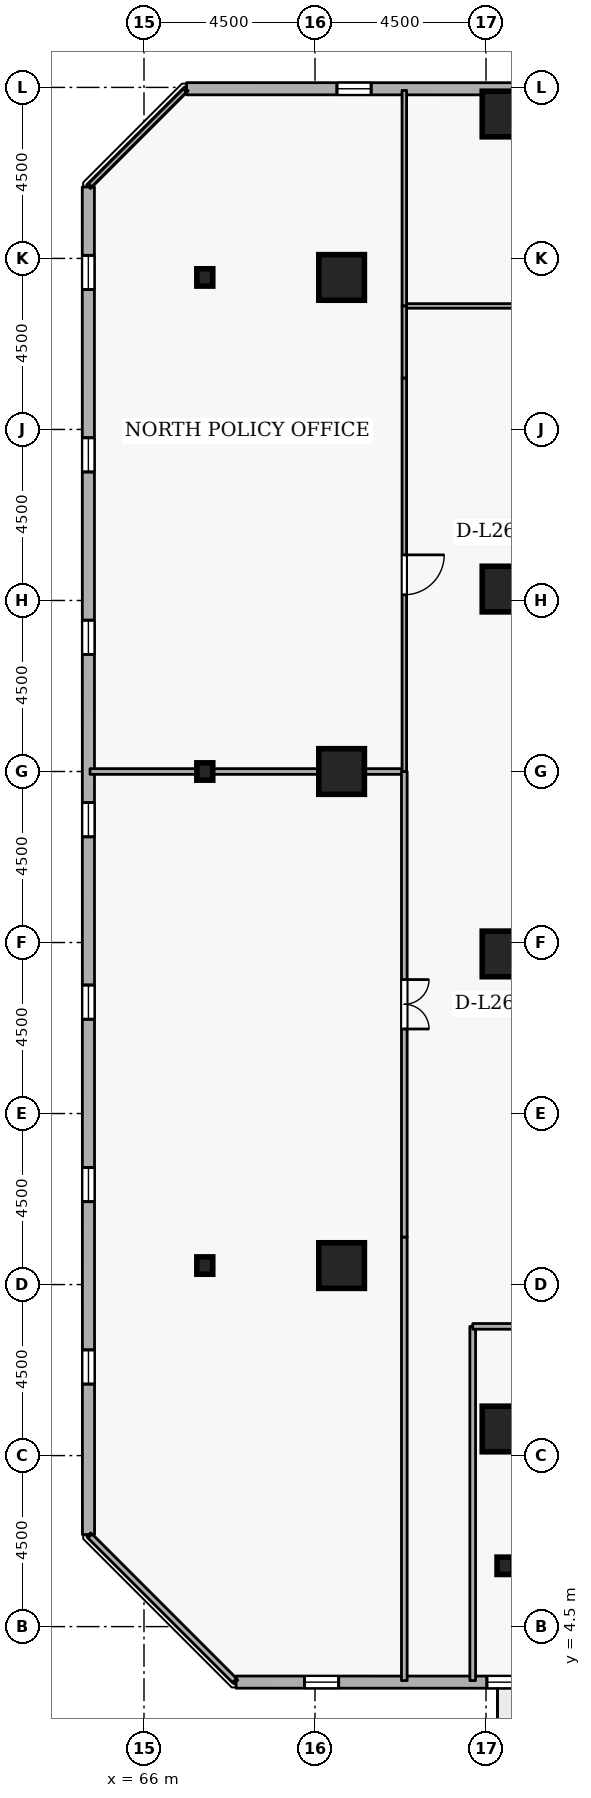
"""IFC4 building model, lengths in metres.
Left out: names, types, materials, properties, quantities, classifications, styles, units other than length and angle.
Written with IfcOpenShell. Run it as: python <this file> out.ifc"""

import sys

from ifc_helpers import new_model, si_unit, direction, frame, frame_2d, origin, origin_2d, place, context, subcontext, project, spatial, rectangle, i_section, extrude, element, fill, save


model = new_model("IFC4")
c1 = context("Model", 3, precision=1e-05, world=origin(), true_north=direction((0.0, 1.0)))
c2 = subcontext(c1, "Body", "Model", "MODEL_VIEW")
j1 = project(units=[si_unit("LENGTHUNIT", "METRE"), si_unit("PLANEANGLEUNIT", "RADIAN")], contexts=[c1])
p1 = place(None, origin())
s1 = spatial("IfcSite", under=j1, at=p1, CompositionType="ELEMENT")
p2 = place(p1, origin())
s2 = spatial("IfcBuilding", under=s1, at=p2, CompositionType="ELEMENT")
p3 = place(p2, frame((0.0, 0.0, 101.7)))
s3 = spatial("IfcBuildingStorey", under=s2, at=p3, CompositionType="ELEMENT", Elevation=101.7)
for number, where, z_axis, x_axis in (
    (1, (75.5, 44.3, 0.0), (0.0, 0.0, 1.0), (1.0, 0.0, 0.0)),
    (2, (71.2, 14.0, 0.0), (0.0, 0.0, 1.0), (1.0, 0.0, 0.0)),
    (3, (71.2, 27.0, 0.0), (0.0, 0.0, 1.0), (1.0, 0.0, 0.0)),
    (4, (71.2, 40.0, 0.0), (0.0, 0.0, 1.0), (1.0, 0.0, 0.0)),
    (5, (75.5, 9.7, 0.0), (0.0, 0.0, 1.0), (1.0, 0.0, 0.0)),
    (6, (75.5, 22.2, 0.0), (0.0, 0.0, 1.0), (1.0, 0.0, 0.0)),
    (7, (75.5, 31.8, 0.0), (0.0, 0.0, 1.0), (1.0, 0.0, 0.0)),
):
    element("IfcColumn", number, at=place(p3, frame(where, z_axis=z_axis, x_axis=x_axis)), inside=s3, PredefinedType="COLUMN", context=c2, shape_type="SweptSolid", body=[
        extrude(rectangle(XDim=1.2, YDim=1.2, at=origin_2d()), origin(), (0.0, 0.0, 1.0), 3.6),
    ])
for number, where, z_axis, x_axis in (
    (8, (67.6, 14.0, 0.0), (0.0, 0.0, 1.0), (1.0, 0.0, 0.0)),
    (9, (67.6, 27.0, 0.0), (0.0, 0.0, 1.0), (1.0, 0.0, 0.0)),
    (10, (67.6, 40.0, 0.0), (0.0, 0.0, 1.0), (1.0, 0.0, 0.0)),
    (11, (75.5, 6.1, 0.0), (0.0, 0.0, 1.0), (1.0, 0.0, 0.0)),
):
    element("IfcColumn", number, at=place(p3, frame(where, z_axis=z_axis, x_axis=x_axis)), inside=s3, PredefinedType="COLUMN", context=c2, shape_type="SweptSolid", body=[
        extrude(i_section(OverallWidth=0.418, OverallDepth=0.456, WebThickness=0.042, FlangeThickness=0.067, FilletRadius=0.015, at=origin_2d()), origin(), (0.0, 0.0, 1.0), 3.6),
    ])
p4 = place(p3, frame((68.423, 3.04, 0.0), z_axis=(0.0, 0.0, 1.0), x_axis=(0.99999999315, -0.00011704845, 0.0)))
e12 = element("IfcWall", 12, at=p4, inside=s3, PredefinedType="STANDARD", context=c2, shape_type="SweptSolid", body=[
    extrude(rectangle(XDim=35.459, YDim=0.32, at=frame_2d((17.729, 0.0))), origin(), (0.0, 0.0, 1.0), 2.7),
])
p5 = place(p4, frame((20.429, 0.0, 0.0)))
e13 = element("IfcOpeningElement", 13, at=p5, cuts=e12, PredefinedType="OPENING", context=c2, shape_type="SweptSolid", body=[
    extrude(rectangle(XDim=1.0, YDim=2.08, at=frame_2d((0.5, 1.04))), frame((0.0, 0.17, 0.0), z_axis=(0.0, -1.0, 0.0), x_axis=(1.0, 0.0, 0.0)), (0.0, 0.0, 1.0), 0.34),
])
p6 = place(p4, frame((1.8, 0.0, 0.72)))
e14 = element("IfcOpeningElement", 14, at=p6, cuts=e12, PredefinedType="OPENING", context=c2, shape_type="SweptSolid", body=[
    extrude(rectangle(XDim=0.9, YDim=1.75, at=frame_2d((0.45, 0.875))), frame((0.0, 0.17, 0.0), z_axis=(0.0, -1.0, 0.0), x_axis=(1.0, 0.0, 0.0)), (0.0, 0.0, 1.0), 0.34),
])
p7 = place(p4, frame((6.6, 0.0, 0.72)))
e15 = element("IfcOpeningElement", 15, at=p7, cuts=e12, PredefinedType="OPENING", context=c2, shape_type="SweptSolid", body=[
    extrude(rectangle(XDim=0.9, YDim=1.75, at=frame_2d((0.45, 0.875))), frame((0.0, 0.17, 0.0), z_axis=(0.0, -1.0, 0.0), x_axis=(1.0, 0.0, 0.0)), (0.0, 0.0, 1.0), 0.34),
])
p8 = place(p4, frame((11.4, 0.0, 0.72)))
e16 = element("IfcOpeningElement", 16, at=p8, cuts=e12, PredefinedType="OPENING", context=c2, shape_type="SweptSolid", body=[
    extrude(rectangle(XDim=0.9, YDim=1.75, at=frame_2d((0.45, 0.875))), frame((0.0, 0.17, 0.0), z_axis=(0.0, -1.0, 0.0), x_axis=(1.0, 0.0, 0.0)), (0.0, 0.0, 1.0), 0.34),
])
p9 = place(p4, frame((16.2, 0.0, 0.72)))
e17 = element("IfcOpeningElement", 17, at=p9, cuts=e12, PredefinedType="OPENING", context=c2, shape_type="SweptSolid", body=[
    extrude(rectangle(XDim=0.9, YDim=1.75, at=frame_2d((0.45, 0.875))), frame((0.0, 0.17, 0.0), z_axis=(0.0, -1.0, 0.0), x_axis=(1.0, 0.0, 0.0)), (0.0, 0.0, 1.0), 0.34),
])
p10 = place(p4, frame((25.8, 0.0, 0.72)))
e18 = element("IfcOpeningElement", 18, at=p10, cuts=e12, PredefinedType="OPENING", context=c2, shape_type="SweptSolid", body=[
    extrude(rectangle(XDim=0.9, YDim=1.75, at=frame_2d((0.45, 0.875))), frame((0.0, 0.17, 0.0), z_axis=(0.0, -1.0, 0.0), x_axis=(1.0, 0.0, 0.0)), (0.0, 0.0, 1.0), 0.34),
])
p11 = place(p4, frame((30.6, 0.0, 0.72)))
e19 = element("IfcOpeningElement", 19, at=p11, cuts=e12, PredefinedType="OPENING", context=c2, shape_type="SweptSolid", body=[
    extrude(rectangle(XDim=0.9, YDim=1.75, at=frame_2d((0.45, 0.875))), frame((0.0, 0.17, 0.0), z_axis=(0.0, -1.0, 0.0), x_axis=(1.0, 0.0, 0.0)), (0.0, 0.0, 1.0), 0.34),
])
p12 = place(p3, frame((102.577, 44.96, 0.0), z_axis=(0.0, 0.0, 1.0), x_axis=(-0.99999999315, 0.00011704845, 0.0)))
e20 = element("IfcWall", 20, at=p12, inside=s3, PredefinedType="STANDARD", context=c2, shape_type="SweptSolid", body=[
    extrude(rectangle(XDim=35.459, YDim=0.32, at=frame_2d((17.729, 0.0))), origin(), (0.0, 0.0, 1.0), 2.7),
])
p13 = place(p12, frame((6.6, 0.0, 0.72)))
e21 = element("IfcOpeningElement", 21, at=p13, cuts=e20, PredefinedType="OPENING", context=c2, shape_type="SweptSolid", body=[
    extrude(rectangle(XDim=0.9, YDim=1.75, at=frame_2d((0.45, 0.875))), frame((0.0, 0.17, 0.0), z_axis=(0.0, -1.0, 0.0), x_axis=(1.0, 0.0, 0.0)), (0.0, 0.0, 1.0), 0.34),
])
p14 = place(p12, frame((11.4, 0.0, 0.72)))
e22 = element("IfcOpeningElement", 22, at=p14, cuts=e20, PredefinedType="OPENING", context=c2, shape_type="SweptSolid", body=[
    extrude(rectangle(XDim=0.9, YDim=1.75, at=frame_2d((0.45, 0.875))), frame((0.0, 0.17, 0.0), z_axis=(0.0, -1.0, 0.0), x_axis=(1.0, 0.0, 0.0)), (0.0, 0.0, 1.0), 0.34),
])
p15 = place(p12, frame((16.2, 0.0, 0.72)))
e23 = element("IfcOpeningElement", 23, at=p15, cuts=e20, PredefinedType="OPENING", context=c2, shape_type="SweptSolid", body=[
    extrude(rectangle(XDim=0.9, YDim=1.75, at=frame_2d((0.45, 0.875))), frame((0.0, 0.17, 0.0), z_axis=(0.0, -1.0, 0.0), x_axis=(1.0, 0.0, 0.0)), (0.0, 0.0, 1.0), 0.34),
])
p16 = place(p12, frame((21.0, 0.0, 0.72)))
e24 = element("IfcOpeningElement", 24, at=p16, cuts=e20, PredefinedType="OPENING", context=c2, shape_type="SweptSolid", body=[
    extrude(rectangle(XDim=0.9, YDim=1.75, at=frame_2d((0.45, 0.875))), frame((0.0, 0.17, 0.0), z_axis=(0.0, -1.0, 0.0), x_axis=(1.0, 0.0, 0.0)), (0.0, 0.0, 1.0), 0.34),
])
p17 = place(p12, frame((30.6, 0.0, 0.72)))
e25 = element("IfcOpeningElement", 25, at=p17, cuts=e20, PredefinedType="OPENING", context=c2, shape_type="SweptSolid", body=[
    extrude(rectangle(XDim=0.9, YDim=1.75, at=frame_2d((0.45, 0.875))), frame((0.0, 0.17, 0.0), z_axis=(0.0, -1.0, 0.0), x_axis=(1.0, 0.0, 0.0)), (0.0, 0.0, 1.0), 0.34),
])
p18 = place(p3, frame((64.535, 42.381, 0.0), z_axis=(0.0, 0.0, 1.0), x_axis=(0.00011704845, -0.99999999315, 0.0)))
e26 = element("IfcWall", 26, at=p18, inside=s3, PredefinedType="STANDARD", context=c2, shape_type="SweptSolid", body=[
    extrude(rectangle(XDim=35.459, YDim=0.32, at=frame_2d((17.729, 0.0))), origin(), (0.0, 0.0, 1.0), 2.7),
])
p19 = place(p18, frame((1.8, 0.0, 0.72)))
e27 = element("IfcOpeningElement", 27, at=p19, cuts=e26, PredefinedType="OPENING", context=c2, shape_type="SweptSolid", body=[
    extrude(rectangle(XDim=0.9, YDim=1.75, at=frame_2d((0.45, 0.875))), frame((0.0, 0.17, 0.0), z_axis=(0.0, -1.0, 0.0), x_axis=(1.0, 0.0, 0.0)), (0.0, 0.0, 1.0), 0.34),
])
p20 = place(p18, frame((6.6, 0.0, 0.72)))
e28 = element("IfcOpeningElement", 28, at=p20, cuts=e26, PredefinedType="OPENING", context=c2, shape_type="SweptSolid", body=[
    extrude(rectangle(XDim=0.9, YDim=1.75, at=frame_2d((0.45, 0.875))), frame((0.0, 0.17, 0.0), z_axis=(0.0, -1.0, 0.0), x_axis=(1.0, 0.0, 0.0)), (0.0, 0.0, 1.0), 0.34),
])
p21 = place(p18, frame((11.4, 0.0, 0.72)))
e29 = element("IfcOpeningElement", 29, at=p21, cuts=e26, PredefinedType="OPENING", context=c2, shape_type="SweptSolid", body=[
    extrude(rectangle(XDim=0.9, YDim=1.75, at=frame_2d((0.45, 0.875))), frame((0.0, 0.17, 0.0), z_axis=(0.0, -1.0, 0.0), x_axis=(1.0, 0.0, 0.0)), (0.0, 0.0, 1.0), 0.34),
])
p22 = place(p18, frame((16.2, 0.0, 0.72)))
e30 = element("IfcOpeningElement", 30, at=p22, cuts=e26, PredefinedType="OPENING", context=c2, shape_type="SweptSolid", body=[
    extrude(rectangle(XDim=0.9, YDim=1.75, at=frame_2d((0.45, 0.875))), frame((0.0, 0.17, 0.0), z_axis=(0.0, -1.0, 0.0), x_axis=(1.0, 0.0, 0.0)), (0.0, 0.0, 1.0), 0.34),
])
p23 = place(p18, frame((21.0, 0.0, 0.72)))
e31 = element("IfcOpeningElement", 31, at=p23, cuts=e26, PredefinedType="OPENING", context=c2, shape_type="SweptSolid", body=[
    extrude(rectangle(XDim=0.9, YDim=1.75, at=frame_2d((0.45, 0.875))), frame((0.0, 0.17, 0.0), z_axis=(0.0, -1.0, 0.0), x_axis=(1.0, 0.0, 0.0)), (0.0, 0.0, 1.0), 0.34),
])
p24 = place(p18, frame((25.8, 0.0, 0.72)))
e32 = element("IfcOpeningElement", 32, at=p24, cuts=e26, PredefinedType="OPENING", context=c2, shape_type="SweptSolid", body=[
    extrude(rectangle(XDim=0.9, YDim=1.75, at=frame_2d((0.45, 0.875))), frame((0.0, 0.17, 0.0), z_axis=(0.0, -1.0, 0.0), x_axis=(1.0, 0.0, 0.0)), (0.0, 0.0, 1.0), 0.34),
])
p25 = place(p18, frame((30.6, 0.0, 0.72)))
e33 = element("IfcOpeningElement", 33, at=p25, cuts=e26, PredefinedType="OPENING", context=c2, shape_type="SweptSolid", body=[
    extrude(rectangle(XDim=0.9, YDim=1.75, at=frame_2d((0.45, 0.875))), frame((0.0, 0.17, 0.0), z_axis=(0.0, -1.0, 0.0), x_axis=(1.0, 0.0, 0.0)), (0.0, 0.0, 1.0), 0.34),
])
p26 = place(p3, frame((74.65, 3.08, 0.0), z_axis=(0.0, 0.0, 1.0), x_axis=(0.0, 1.0, 0.0)))
e34 = element("IfcWall", 34, at=p26, inside=s3, PredefinedType="PARTITIONING", context=c2, shape_type="SweptSolid", body=[
    extrude(rectangle(XDim=9.32, YDim=0.15, at=frame_2d((4.66, 0.0))), origin(), (0.0, 0.0, 1.0), 3.34),
])
p27 = place(p3, frame((74.65, 12.4, 0.0), z_axis=(0.0, 0.0, 1.0), x_axis=(1.0, 0.0, 0.0)))
e35 = element("IfcWall", 35, at=p27, inside=s3, PredefinedType="PARTITIONING", context=c2, shape_type="SweptSolid", body=[
    extrude(rectangle(XDim=4.802, YDim=0.15, at=frame_2d((2.401, 0.0))), origin(), (0.0, 0.0, 1.0), 3.34),
])
p28 = place(p3, frame((82.2, 39.25, 0.0), z_axis=(0.0, 0.0, 1.0), x_axis=(-1.0, 0.0, 0.0)))
e36 = element("IfcWall", 36, at=p28, inside=s3, PredefinedType="PARTITIONING", context=c2, shape_type="SweptSolid", body=[
    extrude(rectangle(XDim=9.35, YDim=0.12, at=frame_2d((4.675, 0.0))), origin(), (0.0, 0.0, 1.0), 3.34),
])
p29 = place(p28, frame((4.15, 0.0, 0.0)))
e37 = element("IfcOpeningElement", 37, at=p29, cuts=e36, PredefinedType="OPENING", context=c2, shape_type="SweptSolid", body=[
    extrude(rectangle(XDim=1.05, YDim=2.1, at=frame_2d((0.525, 1.05))), frame((0.0, 0.07, 0.0), z_axis=(0.0, -1.0, 0.0), x_axis=(1.0, 0.0, 0.0)), (0.0, 0.0, 1.0), 0.14),
])
p30 = place(p3, frame((72.85, 39.25, 0.0), z_axis=(0.0, 0.0, 1.0), x_axis=(0.0, 1.0, 0.0)))
e38 = element("IfcWall", 38, at=p30, inside=s3, PredefinedType="PARTITIONING", context=c2, shape_type="SweptSolid", body=[
    extrude(rectangle(XDim=5.67, YDim=0.12, at=frame_2d((2.835, 0.0))), origin(), (0.0, 0.0, 1.0), 3.34),
])
p31 = place(p3, frame((72.85, 14.75, 0.0), z_axis=(0.0, 0.0, 1.0), x_axis=(0.0, -1.0, 0.0)))
e39 = element("IfcWall", 39, at=p31, inside=s3, PredefinedType="PARTITIONING", context=c2, shape_type="SweptSolid", body=[
    extrude(rectangle(XDim=11.67, YDim=0.15, at=frame_2d((5.835, 0.0))), origin(), (0.0, 0.0, 1.0), 3.34),
])
p32 = place(p3, frame((68.384, 3.08, 0.0), z_axis=(0.0, 0.0, 1.0), x_axis=(-0.707106781187, 0.707106781187, 0.0)))
e40 = element("IfcWall", 40, at=p32, inside=s3, PredefinedType="PARTITIONING", context=c2, shape_type="SweptSolid", body=[
    extrude(rectangle(XDim=5.379, YDim=0.15, at=frame_2d((2.689, 0.0))), origin(), (0.0, 0.0, 1.0), 3.34),
])
p33 = place(p3, frame((64.58, 27.0, 0.0), z_axis=(0.0, 0.0, 1.0), x_axis=(1.0, 0.0, 0.0)))
e41 = element("IfcWall", 41, at=p33, inside=s3, PredefinedType="PARTITIONING", context=c2, shape_type="SweptSolid", body=[
    extrude(rectangle(XDim=8.27, YDim=0.15, at=frame_2d((4.135, 0.0))), origin(), (0.0, 0.0, 1.0), 2.878),
])
p34 = place(p3, frame((72.85, 27.0, 0.0), z_axis=(0.0, 0.0, 1.0), x_axis=(0.0, -1.0, 0.0)))
e42 = element("IfcWall", 42, at=p34, inside=s3, PredefinedType="PARTITIONING", context=c2, shape_type="SweptSolid", body=[
    extrude(rectangle(XDim=12.25, YDim=0.15, at=frame_2d((6.125, 0.0))), origin(), (0.0, 0.0, 1.0), 3.34),
])
p35 = place(p34, frame((5.475, 0.0, 0.0)))
e43 = element("IfcOpeningElement", 43, at=p35, cuts=e42, PredefinedType="OPENING", context=c2, shape_type="SweptSolid", body=[
    extrude(rectangle(XDim=1.3, YDim=2.12, at=frame_2d((0.65, 1.06))), frame((0.0, 0.085, 0.0), z_axis=(0.0, -1.0, 0.0), x_axis=(1.0, 0.0, 0.0)), (0.0, 0.0, 1.0), 0.17),
])
p36 = place(p3, frame((64.58, 42.425, 0.0), z_axis=(0.0, 0.0, 1.0), x_axis=(0.707106781187, 0.707106781187, 0.0)))
e44 = element("IfcWall", 44, at=p36, inside=s3, PredefinedType="PARTITIONING", context=c2, shape_type="SweptSolid", body=[
    extrude(rectangle(XDim=3.528, YDim=0.12, at=frame_2d((1.764, 0.0))), origin(), (0.0, 0.0, 1.0), 3.34),
])
p37 = place(p3, frame((72.85, 39.25, 0.0), z_axis=(0.0, 0.0, 1.0), x_axis=(0.0, -1.0, 0.0)))
e45 = element("IfcWall", 45, at=p37, inside=s3, PredefinedType="PARTITIONING", context=c2, shape_type="SweptSolid", body=[
    extrude(rectangle(XDim=1.9, YDim=0.12, at=frame_2d((0.95, 0.0))), origin(), (0.0, 0.0, 1.0), 3.34),
])
p38 = place(p3, frame((72.85, 37.35, 0.0), z_axis=(0.0, 0.0, 1.0), x_axis=(0.0, -1.0, 0.0)))
e46 = element("IfcWall", 46, at=p38, inside=s3, PredefinedType="PARTITIONING", context=c2, shape_type="SweptSolid", body=[
    extrude(rectangle(XDim=10.35, YDim=0.12, at=frame_2d((5.175, 0.0))), origin(), (0.0, 0.0, 1.0), 2.895),
])
p39 = place(p38, frame((4.65, 0.0, 0.0)))
e47 = element("IfcOpeningElement", 47, at=p39, cuts=e46, PredefinedType="OPENING", context=c2, shape_type="SweptSolid", body=[
    extrude(rectangle(XDim=1.05, YDim=2.1, at=frame_2d((0.525, 1.05))), frame((0.0, 0.07, 0.0), z_axis=(0.0, -1.0, 0.0), x_axis=(1.0, 0.0, 0.0)), (0.0, 0.0, 1.0), 0.14),
])
p40 = place(p6, origin())
e48 = element("IfcWindow", 48, at=p40, inside=s3, PartitioningType="SINGLE_PANEL", PredefinedType="WINDOW", context=c2, shape_type="SweptSolid", body=[
    extrude(rectangle(XDim=0.9, YDim=1.75, at=frame_2d((0.45, 0.875))), frame((0.0, 0.03, 0.0), z_axis=(0.0, -1.0, 0.0), x_axis=(1.0, 0.0, 0.0)), (0.0, 0.0, 1.0), 0.06),
])
fill(e14, e48)
p41 = place(p7, origin())
e49 = element("IfcWindow", 49, at=p41, inside=s3, PartitioningType="SINGLE_PANEL", PredefinedType="WINDOW", context=c2, shape_type="SweptSolid", body=[
    extrude(rectangle(XDim=0.9, YDim=1.75, at=frame_2d((0.45, 0.875))), frame((0.0, 0.03, 0.0), z_axis=(0.0, -1.0, 0.0), x_axis=(1.0, 0.0, 0.0)), (0.0, 0.0, 1.0), 0.06),
])
fill(e15, e49)
p42 = place(p17, origin())
e50 = element("IfcWindow", 50, at=p42, inside=s3, PartitioningType="SINGLE_PANEL", PredefinedType="WINDOW", context=c2, shape_type="SweptSolid", body=[
    extrude(rectangle(XDim=0.9, YDim=1.75, at=frame_2d((0.45, 0.875))), frame((0.0, 0.03, 0.0), z_axis=(0.0, -1.0, 0.0), x_axis=(1.0, 0.0, 0.0)), (0.0, 0.0, 1.0), 0.06),
])
fill(e25, e50)
p43 = place(p19, origin())
e51 = element("IfcWindow", 51, at=p43, inside=s3, PartitioningType="SINGLE_PANEL", PredefinedType="WINDOW", context=c2, shape_type="SweptSolid", body=[
    extrude(rectangle(XDim=0.9, YDim=1.75, at=frame_2d((0.45, 0.875))), frame((0.0, 0.03, 0.0), z_axis=(0.0, -1.0, 0.0), x_axis=(1.0, 0.0, 0.0)), (0.0, 0.0, 1.0), 0.06),
])
fill(e27, e51)
p44 = place(p20, origin())
e52 = element("IfcWindow", 52, at=p44, inside=s3, PartitioningType="SINGLE_PANEL", PredefinedType="WINDOW", context=c2, shape_type="SweptSolid", body=[
    extrude(rectangle(XDim=0.9, YDim=1.75, at=frame_2d((0.45, 0.875))), frame((0.0, 0.03, 0.0), z_axis=(0.0, -1.0, 0.0), x_axis=(1.0, 0.0, 0.0)), (0.0, 0.0, 1.0), 0.06),
])
fill(e28, e52)
p45 = place(p21, origin())
e53 = element("IfcWindow", 53, at=p45, inside=s3, PartitioningType="SINGLE_PANEL", PredefinedType="WINDOW", context=c2, shape_type="SweptSolid", body=[
    extrude(rectangle(XDim=0.9, YDim=1.75, at=frame_2d((0.45, 0.875))), frame((0.0, 0.03, 0.0), z_axis=(0.0, -1.0, 0.0), x_axis=(1.0, 0.0, 0.0)), (0.0, 0.0, 1.0), 0.06),
])
fill(e29, e53)
p46 = place(p22, origin())
e54 = element("IfcWindow", 54, at=p46, inside=s3, PartitioningType="SINGLE_PANEL", PredefinedType="WINDOW", context=c2, shape_type="SweptSolid", body=[
    extrude(rectangle(XDim=0.9, YDim=1.75, at=frame_2d((0.45, 0.875))), frame((0.0, 0.03, 0.0), z_axis=(0.0, -1.0, 0.0), x_axis=(1.0, 0.0, 0.0)), (0.0, 0.0, 1.0), 0.06),
])
fill(e30, e54)
p47 = place(p23, origin())
e55 = element("IfcWindow", 55, at=p47, inside=s3, PartitioningType="SINGLE_PANEL", PredefinedType="WINDOW", context=c2, shape_type="SweptSolid", body=[
    extrude(rectangle(XDim=0.9, YDim=1.75, at=frame_2d((0.45, 0.875))), frame((0.0, 0.03, 0.0), z_axis=(0.0, -1.0, 0.0), x_axis=(1.0, 0.0, 0.0)), (0.0, 0.0, 1.0), 0.06),
])
fill(e31, e55)
p48 = place(p24, origin())
e56 = element("IfcWindow", 56, at=p48, inside=s3, PartitioningType="SINGLE_PANEL", PredefinedType="WINDOW", context=c2, shape_type="SweptSolid", body=[
    extrude(rectangle(XDim=0.9, YDim=1.75, at=frame_2d((0.45, 0.875))), frame((0.0, 0.03, 0.0), z_axis=(0.0, -1.0, 0.0), x_axis=(1.0, 0.0, 0.0)), (0.0, 0.0, 1.0), 0.06),
])
fill(e32, e56)
p49 = place(p25, origin())
e57 = element("IfcWindow", 57, at=p49, inside=s3, PartitioningType="SINGLE_PANEL", PredefinedType="WINDOW", context=c2, shape_type="SweptSolid", body=[
    extrude(rectangle(XDim=0.9, YDim=1.75, at=frame_2d((0.45, 0.875))), frame((0.0, 0.03, 0.0), z_axis=(0.0, -1.0, 0.0), x_axis=(1.0, 0.0, 0.0)), (0.0, 0.0, 1.0), 0.06),
])
fill(e33, e57)
p50 = place(p35, origin())
e58 = element("IfcDoor", 58, at=p50, inside=s3, OperationType="DOUBLE_DOOR_SINGLE_SWING", PredefinedType="DOOR", context=c2, shape_type="SweptSolid", body=[
    extrude(rectangle(XDim=1.3, YDim=2.12, at=frame_2d((0.65, 1.06))), frame((0.0, 0.025, 0.0), z_axis=(0.0, -1.0, 0.0), x_axis=(1.0, 0.0, 0.0)), (0.0, 0.0, 1.0), 0.05),
])
fill(e43, e58)
p51 = place(p39, origin())
e59 = element("IfcDoor", 59, at=p51, inside=s3, OperationType="SINGLE_SWING_LEFT", PredefinedType="DOOR", context=c2, shape_type="SweptSolid", body=[
    extrude(rectangle(XDim=1.05, YDim=2.1, at=frame_2d((0.525, 1.05))), frame((0.0, 0.025, 0.0), z_axis=(0.0, -1.0, 0.0), x_axis=(1.0, 0.0, 0.0)), (0.0, 0.0, 1.0), 0.05),
])
fill(e47, e59)
save(model, sys.argv[1])
